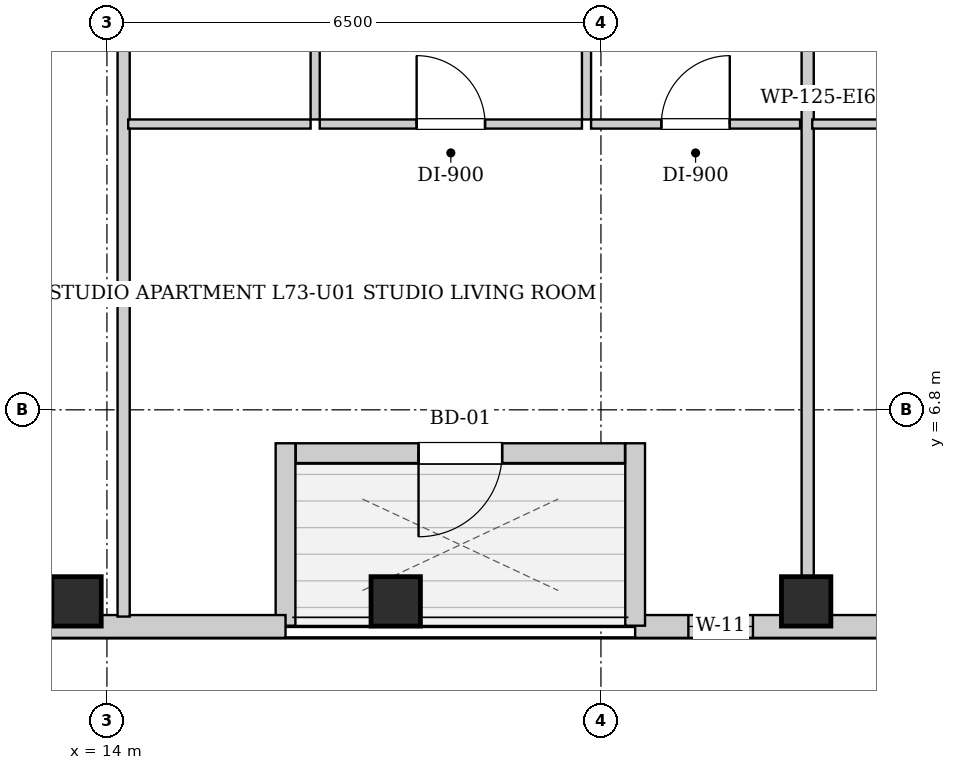
"""IFC4 building model, lengths in metres.
Left out: names, types, materials, properties, quantities, classifications, styles, units other than length and angle.
Written with IfcOpenShell. Run it as: python <this file> out.ifc"""

import sys

from ifc_helpers import new_model, si_unit, direction, frame, frame_2d, origin, origin_2d, place, context, subcontext, project, spatial, rectangle, extrude, element, fill, save


model = new_model("IFC4")
c1 = context("Model", 3, precision=1e-05, world=origin(), true_north=direction((0.0, 1.0)))
c2 = subcontext(c1, "Body", "Model", "MODEL_VIEW")
j1 = project(units=[si_unit("LENGTHUNIT", "METRE"), si_unit("PLANEANGLEUNIT", "RADIAN")], contexts=[c1])
p1 = place(None, origin())
s1 = spatial("IfcSite", under=j1, at=p1, CompositionType="ELEMENT")
p2 = place(p1, origin())
s2 = spatial("IfcBuilding", under=s1, at=p2, CompositionType="ELEMENT")
p3 = place(p2, frame((0.0, 0.0, 251.3)))
s3 = spatial("IfcBuildingStorey", under=s2, at=p3, CompositionType="ELEMENT", Elevation=251.3)
for number, where, z_axis, x_axis in (
    (1, (13.6, 4.28, 0.0), (0.0, 0.0, 1.0), (1.0, 0.0, 0.0)),
    (2, (17.8, 4.28, 0.0), (0.0, 0.0, 1.0), (1.0, 0.0, 0.0)),
    (3, (23.2, 4.28, 0.0), (0.0, 0.0, 1.0), (1.0, 0.0, 0.0)),
):
    element("IfcColumn", number, at=place(p3, frame(where, z_axis=z_axis, x_axis=x_axis)), inside=s3, PredefinedType="COLUMN", context=c2, shape_type="SweptSolid", body=[
        extrude(rectangle(XDim=0.65, YDim=0.65, at=origin_2d()), origin(), (0.0, 0.0, 1.0), 3.4),
    ])
p4 = place(p3, frame((37.8, 3.95, 0.0), z_axis=(0.0, 0.0, 1.0), x_axis=(-1.0, 0.0, 0.0)))
e4 = element("IfcWall", 4, at=p4, inside=s3, PredefinedType="SOLIDWALL", context=c2, shape_type="SweptSolid", body=[
    extrude(rectangle(XDim=16.85, YDim=0.3, at=frame_2d((8.425, 0.0))), origin(), (0.0, 0.0, 1.0), 3.14),
])
p5 = place(p4, frame((15.3, 0.0, 0.55)))
e5 = element("IfcOpeningElement", 5, at=p5, cuts=e4, PredefinedType="OPENING", context=c2, shape_type="SweptSolid", body=[
    extrude(rectangle(XDim=0.85, YDim=1.2, at=frame_2d((0.425, 0.6))), frame((0.0, 0.16, 0.0), z_axis=(0.0, -1.0, 0.0), x_axis=(1.0, 0.0, 0.0)), (0.0, 0.0, 1.0), 0.32),
])
p6 = place(p4, frame((8.95, 0.0, 0.55)))
e6 = element("IfcOpeningElement", 6, at=p6, cuts=e4, PredefinedType="OPENING", context=c2, shape_type="SweptSolid", body=[
    extrude(rectangle(XDim=1.35, YDim=1.2, at=frame_2d((0.675, 0.6))), frame((0.0, 0.16, 0.0), z_axis=(0.0, -1.0, 0.0), x_axis=(1.0, 0.0, 0.0)), (0.0, 0.0, 1.0), 0.32),
])
p7 = place(p4, frame((5.085, 0.0, 0.55)))
e7 = element("IfcOpeningElement", 7, at=p7, cuts=e4, PredefinedType="OPENING", context=c2, shape_type="SweptSolid", body=[
    extrude(rectangle(XDim=1.35, YDim=1.2, at=frame_2d((0.675, 0.6))), frame((0.0, 0.16, 0.0), z_axis=(0.0, -1.0, 0.0), x_axis=(1.0, 0.0, 0.0)), (0.0, 0.0, 1.0), 0.32),
])
p8 = place(p4, frame((2.757, 0.0, 0.55)))
e8 = element("IfcOpeningElement", 8, at=p8, cuts=e4, PredefinedType="OPENING", context=c2, shape_type="SweptSolid", body=[
    extrude(rectangle(XDim=1.35, YDim=1.2, at=frame_2d((0.675, 0.6))), frame((0.0, 0.16, 0.0), z_axis=(0.0, -1.0, 0.0), x_axis=(1.0, 0.0, 0.0)), (0.0, 0.0, 1.0), 0.32),
])
p9 = place(p3, frame((20.95, 3.96, 0.0), z_axis=(0.0, 0.0, 1.0), x_axis=(0.0, 1.0, 0.0)))
e9 = element("IfcWall", 9, at=p9, inside=s3, PredefinedType="SOLIDWALL", context=c2, shape_type="SweptSolid", body=[
    extrude(rectangle(XDim=2.4, YDim=0.26, at=frame_2d((1.2, 0.0))), origin(), (0.0, 0.0, 1.0), 3.14),
])
p10 = place(p3, frame((20.816, 6.23, 0.0), z_axis=(0.0, 0.0, 1.0), x_axis=(-1.0, 0.0, 0.0)))
e10 = element("IfcWall", 10, at=p10, inside=s3, PredefinedType="SOLIDWALL", context=c2, shape_type="SweptSolid", body=[
    extrude(rectangle(XDim=4.332, YDim=0.26, at=frame_2d((2.166, 0.0))), origin(), (0.0, 0.0, 1.0), 3.14),
])
p11 = place(p10, frame((1.616, 0.0, 0.0)))
e11 = element("IfcOpeningElement", 11, at=p11, cuts=e10, PredefinedType="OPENING", context=c2, shape_type="SweptSolid", body=[
    extrude(rectangle(XDim=1.1, YDim=2.0, at=frame_2d((0.55, 1.0))), frame((0.0, 0.14, 0.0), z_axis=(0.0, -1.0, 0.0), x_axis=(1.0, 0.0, 0.0)), (0.0, 0.0, 1.0), 0.28),
])
p12 = place(p3, frame((16.35, 6.36, 0.0), z_axis=(0.0, 0.0, 1.0), x_axis=(0.0, -1.0, 0.0)))
e12 = element("IfcWall", 12, at=p12, inside=s3, PredefinedType="SOLIDWALL", context=c2, shape_type="SweptSolid", body=[
    extrude(rectangle(XDim=2.4, YDim=0.26, at=frame_2d((1.2, 0.0))), origin(), (0.0, 0.0, 1.0), 3.14),
])
p13 = place(p3, frame((16.35, 3.95, 0.0), z_axis=(0.0, 0.0, 1.0), x_axis=(-1.0, 0.0, 0.0)))
e13 = element("IfcWall", 13, at=p13, inside=s3, PredefinedType="SOLIDWALL", context=c2, shape_type="SweptSolid", body=[
    extrude(rectangle(XDim=3.25, YDim=0.3, at=frame_2d((1.625, 0.0))), origin(), (0.0, 0.0, 1.0), 3.14),
])
p14 = place(p3, frame((14.22, 4.08, 0.0), z_axis=(0.0, 0.0, 1.0), x_axis=(0.0, 1.0, 0.0)))
e14 = element("IfcWall", 14, at=p14, inside=s3, PredefinedType="PARTITIONING", context=c2, shape_type="SweptSolid", body=[
    extrude(rectangle(XDim=9.39, YDim=0.16, at=frame_2d((4.695, 0.0))), origin(), (0.0, 0.0, 1.0), 3.14),
])
p15 = place(p3, frame((16.74, 10.62, 0.0), z_axis=(0.0, 0.0, 1.0), x_axis=(0.0, 1.0, 0.0)))
e15 = element("IfcWall", 15, at=p15, inside=s3, PredefinedType="PARTITIONING", context=c2, shape_type="SweptSolid", body=[
    extrude(rectangle(XDim=2.85, YDim=0.12, at=frame_2d((1.425, 0.0))), origin(), (0.0, 0.0, 1.0), 3.14),
])
p16 = place(p15, frame((0.995, 0.0, 0.0)))
e16 = element("IfcOpeningElement", 16, at=p16, cuts=e15, PredefinedType="OPENING", context=c2, shape_type="SweptSolid", body=[
    extrude(rectangle(XDim=0.86, YDim=2.05, at=frame_2d((0.43, 1.025))), frame((0.0, 0.07, 0.0), z_axis=(0.0, -1.0, 0.0), x_axis=(1.0, 0.0, 0.0)), (0.0, 0.0, 1.0), 0.14),
])
p17 = place(p3, frame((14.28, 10.56, 0.0), z_axis=(0.0, 0.0, 1.0), x_axis=(1.0, 0.0, 0.0)))
e17 = element("IfcWall", 17, at=p17, inside=s3, PredefinedType="PARTITIONING", context=c2, shape_type="SweptSolid", body=[
    extrude(rectangle(XDim=2.4, YDim=0.12, at=frame_2d((1.2, 0.0))), origin(), (0.0, 0.0, 1.0), 3.14),
])
p18 = place(p3, frame((20.31, 10.62, 0.0), z_axis=(0.0, 0.0, 1.0), x_axis=(0.0, 1.0, 0.0)))
e18 = element("IfcWall", 18, at=p18, inside=s3, PredefinedType="PARTITIONING", context=c2, shape_type="SweptSolid", body=[
    extrude(rectangle(XDim=2.85, YDim=0.12, at=frame_2d((1.425, 0.0))), origin(), (0.0, 0.0, 1.0), 3.14),
])
p19 = place(p18, frame((0.975, 0.0, 0.0)))
e19 = element("IfcOpeningElement", 19, at=p19, cuts=e18, PredefinedType="OPENING", context=c2, shape_type="SweptSolid", body=[
    extrude(rectangle(XDim=0.9, YDim=2.05, at=frame_2d((0.45, 1.025))), frame((0.0, 0.07, 0.0), z_axis=(0.0, -1.0, 0.0), x_axis=(1.0, 0.0, 0.0)), (0.0, 0.0, 1.0), 0.14),
])
p20 = place(p3, frame((16.8, 10.56, 0.0), z_axis=(0.0, 0.0, 1.0), x_axis=(1.0, 0.0, 0.0)))
e20 = element("IfcWall", 20, at=p20, inside=s3, PredefinedType="PARTITIONING", context=c2, shape_type="SweptSolid", body=[
    extrude(rectangle(XDim=3.45, YDim=0.12, at=frame_2d((1.725, 0.0))), origin(), (0.0, 0.0, 1.0), 3.14),
])
p21 = place(p20, frame((1.275, 0.0, 0.0)))
e21 = element("IfcOpeningElement", 21, at=p21, cuts=e20, PredefinedType="OPENING", context=c2, shape_type="SweptSolid", body=[
    extrude(rectangle(XDim=0.9, YDim=2.05, at=frame_2d((0.45, 1.025))), frame((0.0, 0.07, 0.0), z_axis=(0.0, -1.0, 0.0), x_axis=(1.0, 0.0, 0.0)), (0.0, 0.0, 1.0), 0.14),
])
p22 = place(p3, frame((20.37, 10.56, 0.0), z_axis=(0.0, 0.0, 1.0), x_axis=(1.0, 0.0, 0.0)))
e22 = element("IfcWall", 22, at=p22, inside=s3, PredefinedType="PARTITIONING", context=c2, shape_type="SweptSolid", body=[
    extrude(rectangle(XDim=2.75, YDim=0.12, at=frame_2d((1.375, 0.0))), origin(), (0.0, 0.0, 1.0), 3.14),
])
p23 = place(p22, frame((0.925, 0.0, 0.0)))
e23 = element("IfcOpeningElement", 23, at=p23, cuts=e22, PredefinedType="OPENING", context=c2, shape_type="SweptSolid", body=[
    extrude(rectangle(XDim=0.9, YDim=2.05, at=frame_2d((0.45, 1.025))), frame((0.0, 0.07, 0.0), z_axis=(0.0, -1.0, 0.0), x_axis=(1.0, 0.0, 0.0)), (0.0, 0.0, 1.0), 0.14),
])
p24 = place(p3, frame((23.22, 4.08, 0.0), z_axis=(0.0, 0.0, 1.0), x_axis=(0.0, 1.0, 0.0)))
e24 = element("IfcWall", 24, at=p24, inside=s3, PredefinedType="PARTITIONING", context=c2, shape_type="SweptSolid", body=[
    extrude(rectangle(XDim=9.39, YDim=0.16, at=frame_2d((4.695, 0.0))), origin(), (0.0, 0.0, 1.0), 3.14),
])
p25 = place(p3, frame((23.28, 10.56, 0.0), z_axis=(0.0, 0.0, 1.0), x_axis=(1.0, 0.0, 0.0)))
e25 = element("IfcWall", 25, at=p25, inside=s3, PredefinedType="PARTITIONING", context=c2, shape_type="SweptSolid", body=[
    extrude(rectangle(XDim=1.85, YDim=0.12, at=frame_2d((0.925, 0.0))), origin(), (0.0, 0.0, 1.0), 3.14),
])
p26 = place(p21, origin())
e26 = element("IfcDoor", 26, at=p26, inside=s3, OperationType="SINGLE_SWING_LEFT", PredefinedType="DOOR", context=c2, shape_type="SweptSolid", body=[
    extrude(rectangle(XDim=0.9, YDim=2.05, at=frame_2d((0.45, 1.025))), frame((0.0, 0.025, 0.0), z_axis=(0.0, -1.0, 0.0), x_axis=(1.0, 0.0, 0.0)), (0.0, 0.0, 1.0), 0.05),
])
fill(e21, e26)
p27 = place(p23, origin())
e27 = element("IfcDoor", 27, at=p27, inside=s3, OperationType="SINGLE_SWING_RIGHT", PredefinedType="DOOR", context=c2, shape_type="SweptSolid", body=[
    extrude(rectangle(XDim=0.9, YDim=2.05, at=frame_2d((0.45, 1.025))), frame((0.0, 0.025, 0.0), z_axis=(0.0, -1.0, 0.0), x_axis=(1.0, 0.0, 0.0)), (0.0, 0.0, 1.0), 0.05),
])
fill(e23, e27)
p28 = place(p11, origin())
e28 = element("IfcDoor", 28, at=p28, inside=s3, OperationType="SINGLE_SWING_RIGHT", PredefinedType="DOOR", context=c2, shape_type="SweptSolid", body=[
    extrude(rectangle(XDim=1.1, YDim=2.0, at=frame_2d((0.55, 1.0))), frame((0.0, 0.025, 0.0), z_axis=(0.0, -1.0, 0.0), x_axis=(1.0, 0.0, 0.0)), (0.0, 0.0, 1.0), 0.05),
])
fill(e11, e28)
p29 = place(p5, origin())
e29 = element("IfcWindow", 29, at=p29, inside=s3, PartitioningType="SINGLE_PANEL", PredefinedType="WINDOW", context=c2, shape_type="SweptSolid", body=[
    extrude(rectangle(XDim=0.85, YDim=1.2, at=frame_2d((0.425, 0.6))), frame((0.0, 0.03, 0.0), z_axis=(0.0, -1.0, 0.0), x_axis=(1.0, 0.0, 0.0)), (0.0, 0.0, 1.0), 0.06),
])
fill(e5, e29)
save(model, sys.argv[1])
